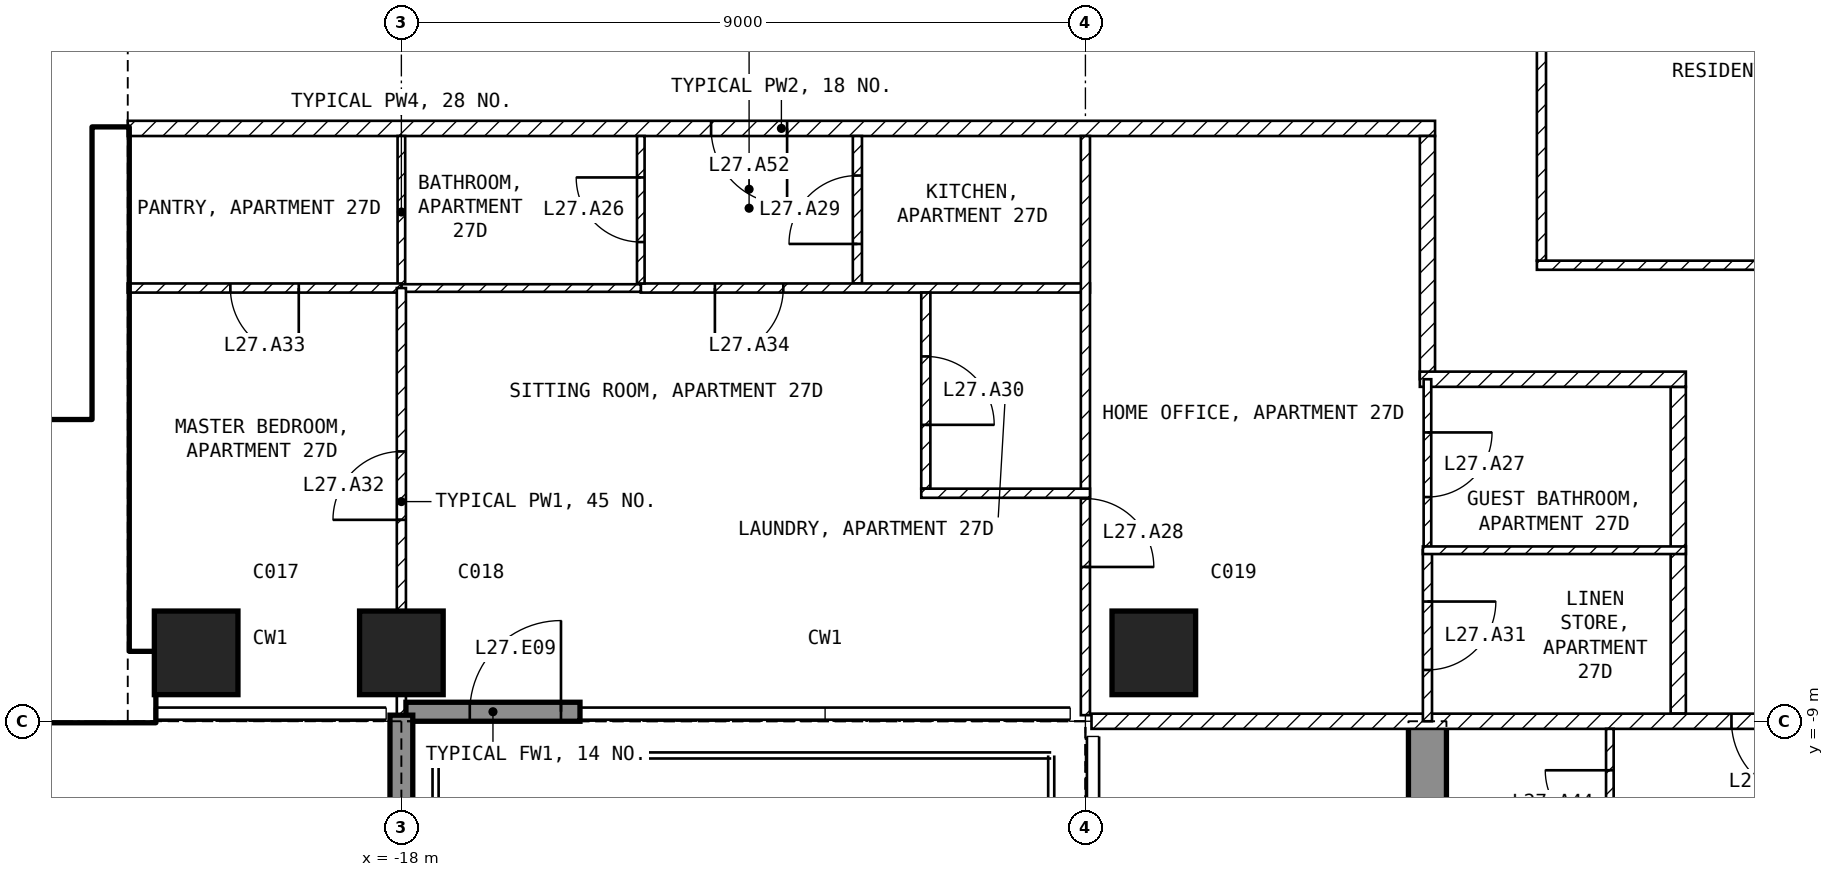
"""IFC4 building model, lengths in metres.
Left out: names, types, materials, properties, quantities, classifications, styles, units other than length and angle.
Written with IfcOpenShell. Run it as: python <this file> out.ifc"""

import sys

from ifc_helpers import new_model, si_unit, direction, frame, frame_2d, origin, origin_2d, place, context, subcontext, project, spatial, polyline, rectangle, outline, extrude, element, fill, save


model = new_model("IFC4")
c1 = context("Model", 3, precision=1e-05, world=origin(), true_north=direction((0.0, 1.0)))
c2 = subcontext(c1, "Body", "Model", "MODEL_VIEW")
j1 = project(units=[si_unit("LENGTHUNIT", "METRE"), si_unit("PLANEANGLEUNIT", "RADIAN")], contexts=[c1])
p1 = place(None, origin())
s1 = spatial("IfcSite", under=j1, at=p1, CompositionType="ELEMENT")
p2 = place(p1, origin())
s2 = spatial("IfcBuilding", under=s1, at=p2, CompositionType="ELEMENT")
p3 = place(p2, frame((0.0, 0.0, 116.4)))
s3 = spatial("IfcBuildingStorey", under=s2, at=p3, CompositionType="ELEMENT", Elevation=116.4)
for number, where, z_axis, x_axis in (
    (1, (-20.7, -8.1, -0.25), (0.0, 0.0, 1.0), (1.0, 0.0, 0.0)),
    (2, (-18.0, -8.1, -0.25), (0.0, 0.0, 1.0), (1.0, 0.0, 0.0)),
    (3, (-8.1, -8.1, -0.25), (0.0, 0.0, 1.0), (1.0, 0.0, 0.0)),
):
    element("IfcColumn", number, at=place(p3, frame(where, z_axis=z_axis, x_axis=x_axis)), inside=s3, PredefinedType="COLUMN", context=c2, shape_type="SweptSolid", body=[
        extrude(rectangle(XDim=1.1, YDim=1.1, at=origin_2d()), origin(), (0.0, 0.0, 1.0), 3.5),
    ])
p4 = place(p3, frame((-4.75, -20.15, -0.25), z_axis=(1.0, 0.0, 0.0), x_axis=(0.0, 1.0, 0.0)))
e4 = element("IfcWall", 4, at=p4, inside=s3, PredefinedType="SHEAR", context=c2, shape_type="SweptSolid", body=[
    extrude(outline(polyline([(0.0, 0.0), (6.65, 0.0), (6.65, 2.65), (9.05, 2.65), (9.05, 0.0), (11.15, 0.0), (11.15, 3.5), (0.0, 3.5), (0.0, 0.0)])), origin(), (0.0, 0.0, 1.0), 0.5),
])
p5 = place(p3, frame((-17.94, -8.875, 0.0), z_axis=(0.0, 0.0, 1.0), x_axis=(1.0, 0.0, 0.0)))
e5 = element("IfcWall", 5, at=p5, inside=s3, PredefinedType="SOLIDWALL", context=c2, shape_type="SweptSolid", body=[
    extrude(rectangle(XDim=2.29, YDim=0.25, at=frame_2d((1.145, 0.0))), origin(), (0.0, 0.0, 1.0), 3.25),
])
p6 = place(p5, frame((0.84, 0.0, 0.0)))
e6 = element("IfcOpeningElement", 6, at=p6, cuts=e5, PredefinedType="OPENING", context=c2, shape_type="SweptSolid", body=[
    extrude(rectangle(XDim=1.2, YDim=2.4, at=frame_2d((0.6, 1.2))), frame((0.0, 0.135, 0.0), z_axis=(0.0, -1.0, 0.0), x_axis=(1.0, 0.0, 0.0)), (0.0, 0.0, 1.0), 0.27),
])
p7 = place(p3, frame((-18.0, -8.92, 0.0), z_axis=(0.0, 0.0, 1.0), x_axis=(0.0, -1.0, 0.0)))
e7 = element("IfcWall", 7, at=p7, inside=s3, PredefinedType="SOLIDWALL", context=c2, shape_type="SweptSolid", body=[
    extrude(rectangle(XDim=2.82, YDim=0.3, at=frame_2d((1.41, 0.0))), origin(), (0.0, 0.0, 1.0), 3.25),
])
p8 = place(p3, frame((-30.2, -8.55, 0.0), z_axis=(0.0, 0.0, 1.0), x_axis=(1.0, 0.0, 0.0)))
e8 = element("IfcWall", 8, at=p8, inside=s3, PredefinedType="SHEAR", context=c2, shape_type="SweptSolid", body=[
    extrude(rectangle(XDim=8.95, YDim=0.9, at=frame_2d((4.475, 0.0))), origin(), (0.0, 0.0, 1.0), 3.25),
])
p9 = place(p3, frame((-21.825, -8.1, 0.0), z_axis=(0.0, 0.0, 1.0), x_axis=(0.0, 1.0, 0.0)))
e9 = element("IfcWall", 9, at=p9, inside=s3, PredefinedType="SHEAR", context=c2, shape_type="SweptSolid", body=[
    extrude(rectangle(XDim=6.9, YDim=0.45, at=frame_2d((3.45, 0.0))), origin(), (0.0, 0.0, 1.0), 3.25),
])
p10 = place(p3, frame((-28.35, -5.15, 0.0), z_axis=(0.0, 0.0, 1.0), x_axis=(1.0, 0.0, 0.0)))
e10 = element("IfcWall", 10, at=p10, inside=s3, PredefinedType="SOLIDWALL", context=c2, shape_type="SweptSolid", body=[
    extrude(rectangle(XDim=6.3, YDim=0.2, at=frame_2d((3.15, 0.0))), origin(), (0.0, 0.0, 1.0), 3.25),
])
p11 = place(p10, frame((5.1, 0.0, 0.0)))
e11 = element("IfcOpeningElement", 11, at=p11, cuts=e10, PredefinedType="OPENING", context=c2, shape_type="SweptSolid", body=[
    extrude(rectangle(XDim=1.0, YDim=2.1, at=frame_2d((0.5, 1.05))), frame((0.0, 0.11, 0.0), z_axis=(0.0, -1.0, 0.0), x_axis=(1.0, 0.0, 0.0)), (0.0, 0.0, 1.0), 0.22),
])
p12 = place(p3, frame((-3.06, -3.0, 0.0), z_axis=(0.0, 0.0, 1.0), x_axis=(1.0, 0.0, 0.0)))
e12 = element("IfcWall", 12, at=p12, inside=s3, PredefinedType="PARTITIONING", context=c2, shape_type="SweptSolid", body=[
    extrude(rectangle(XDim=6.12, YDim=0.12, at=frame_2d((3.06, 0.0))), origin(), (0.0, 0.0, 1.0), 3.25),
])
p13 = place(p3, frame((-3.0, 2.94, 0.0), z_axis=(0.0, 0.0, 1.0), x_axis=(0.0, -1.0, 0.0)))
e13 = element("IfcWall", 13, at=p13, inside=s3, PredefinedType="PARTITIONING", context=c2, shape_type="SweptSolid", body=[
    extrude(rectangle(XDim=5.88, YDim=0.12, at=frame_2d((2.94, 0.0))), origin(), (0.0, 0.0, 1.0), 3.25),
])
p14 = place(p3, frame((-4.4, -1.2, 0.0), z_axis=(0.0, 0.0, 1.0), x_axis=(-1.0, 0.0, 0.0)))
e14 = element("IfcWall", 14, at=p14, inside=s3, PredefinedType="PARTITIONING", context=c2, shape_type="SweptSolid", body=[
    extrude(rectangle(XDim=17.2, YDim=0.2, at=frame_2d((8.6, 0.0))), origin(), (0.0, 0.0, 1.0), 3.25),
])
p15 = place(p14, frame((8.525, 0.0, 0.0)))
e15 = element("IfcOpeningElement", 15, at=p15, cuts=e14, PredefinedType="OPENING", context=c2, shape_type="SweptSolid", body=[
    extrude(rectangle(XDim=1.0, YDim=2.1, at=frame_2d((0.5, 1.05))), frame((0.0, 0.11, 0.0), z_axis=(0.0, -1.0, 0.0), x_axis=(1.0, 0.0, 0.0)), (0.0, 0.0, 1.0), 0.22),
])
p16 = place(p3, frame((-4.5, -4.5, 0.0), z_axis=(0.0, 0.0, 1.0), x_axis=(0.0, 1.0, 0.0)))
e16 = element("IfcWall", 16, at=p16, inside=s3, PredefinedType="PARTITIONING", context=c2, shape_type="SweptSolid", body=[
    extrude(rectangle(XDim=3.2, YDim=0.2, at=frame_2d((1.6, 0.0))), origin(), (0.0, 0.0, 1.0), 3.25),
])
p17 = place(p3, frame((-1.2, -8.9, 0.0), z_axis=(0.0, 0.0, 1.0), x_axis=(0.0, 1.0, 0.0)))
e17 = element("IfcWall", 17, at=p17, inside=s3, PredefinedType="PARTITIONING", context=c2, shape_type="SweptSolid", body=[
    extrude(rectangle(XDim=4.3, YDim=0.2, at=frame_2d((2.15, 0.0))), origin(), (0.0, 0.0, 1.0), 3.25),
])
p18 = place(p3, frame((-1.1, -4.5, 0.0), z_axis=(0.0, 0.0, 1.0), x_axis=(-1.0, 0.0, 0.0)))
e18 = element("IfcWall", 18, at=p18, inside=s3, PredefinedType="PARTITIONING", context=c2, shape_type="SweptSolid", body=[
    extrude(rectangle(XDim=3.5, YDim=0.2, at=frame_2d((1.75, 0.0))), origin(), (0.0, 0.0, 1.0), 3.25),
])
p19 = place(p3, frame((8.92, -9.0, 0.0), z_axis=(0.0, 0.0, 1.0), x_axis=(-1.0, 0.0, 0.0)))
e19 = element("IfcWall", 19, at=p19, inside=s3, PredefinedType="PARTITIONING", context=c2, shape_type="SweptSolid", body=[
    extrude(rectangle(XDim=17.84, YDim=0.2, at=frame_2d((8.92, 0.0))), origin(), (0.0, 0.0, 1.0), 3.25),
])
p20 = place(p19, frame((8.42, 0.0, 0.0)))
e20 = element("IfcOpeningElement", 20, at=p20, cuts=e19, PredefinedType="OPENING", context=c2, shape_type="SweptSolid", body=[
    extrude(rectangle(XDim=1.0, YDim=2.1, at=frame_2d((0.5, 1.05))), frame((0.0, 0.11, 0.0), z_axis=(0.0, -1.0, 0.0), x_axis=(1.0, 0.0, 0.0)), (0.0, 0.0, 1.0), 0.22),
])
p21 = place(p3, frame((-12.0, -3.24, 0.0), z_axis=(0.0, 0.0, 1.0), x_axis=(0.0, 1.0, 0.0)))
e21 = element("IfcWall", 21, at=p21, inside=s3, PredefinedType="PARTITIONING", context=c2, shape_type="SweptSolid", body=[
    extrude(rectangle(XDim=1.94, YDim=0.12, at=frame_2d((0.97, 0.0))), origin(), (0.0, 0.0, 1.0), 3.25),
])
p22 = place(p21, frame((0.52, 0.0, 0.0)))
e22 = element("IfcOpeningElement", 22, at=p22, cuts=e21, PredefinedType="OPENING", context=c2, shape_type="SweptSolid", body=[
    extrude(rectangle(XDim=0.9, YDim=2.1, at=frame_2d((0.45, 1.05))), frame((0.0, 0.07, 0.0), z_axis=(0.0, -1.0, 0.0), x_axis=(1.0, 0.0, 0.0)), (0.0, 0.0, 1.0), 0.14),
])
p23 = place(p3, frame((-8.94, -3.3, 0.0), z_axis=(0.0, 0.0, 1.0), x_axis=(-1.0, 0.0, 0.0)))
e23 = element("IfcWall", 23, at=p23, inside=s3, PredefinedType="PARTITIONING", context=c2, shape_type="SweptSolid", body=[
    extrude(rectangle(XDim=5.91, YDim=0.12, at=frame_2d((2.955, 0.0))), origin(), (0.0, 0.0, 1.0), 3.25),
])
p24 = place(p23, frame((4.035, 0.0, 0.0)))
e24 = element("IfcOpeningElement", 24, at=p24, cuts=e23, PredefinedType="OPENING", context=c2, shape_type="SweptSolid", body=[
    extrude(rectangle(XDim=0.9, YDim=2.1, at=frame_2d((0.45, 1.05))), frame((0.0, 0.07, 0.0), z_axis=(0.0, -1.0, 0.0), x_axis=(1.0, 0.0, 0.0)), (0.0, 0.0, 1.0), 0.14),
])
p25 = place(p3, frame((-9.0, -1.3, 0.0), z_axis=(0.0, 0.0, 1.0), x_axis=(0.0, -1.0, 0.0)))
e25 = element("IfcWall", 25, at=p25, inside=s3, PredefinedType="PARTITIONING", context=c2, shape_type="SweptSolid", body=[
    extrude(rectangle(XDim=7.62, YDim=0.12, at=frame_2d((3.81, 0.0))), origin(), (0.0, 0.0, 1.0), 3.25),
])
p26 = place(p25, frame((4.77, 0.0, 0.0)))
e26 = element("IfcOpeningElement", 26, at=p26, cuts=e25, PredefinedType="OPENING", context=c2, shape_type="SweptSolid", body=[
    extrude(rectangle(XDim=0.9, YDim=2.1, at=frame_2d((0.45, 1.05))), frame((0.0, 0.07, 0.0), z_axis=(0.0, -1.0, 0.0), x_axis=(1.0, 0.0, 0.0)), (0.0, 0.0, 1.0), 0.14),
])
p27 = place(p3, frame((-14.85, -3.24, 0.0), z_axis=(0.0, 0.0, 1.0), x_axis=(0.0, 1.0, 0.0)))
e27 = element("IfcWall", 27, at=p27, inside=s3, PredefinedType="PARTITIONING", context=c2, shape_type="SweptSolid", body=[
    extrude(rectangle(XDim=1.94, YDim=0.1, at=frame_2d((0.97, 0.0))), origin(), (0.0, 0.0, 1.0), 3.25),
])
p28 = place(p27, frame((0.545, 0.0, 0.0)))
e28 = element("IfcOpeningElement", 28, at=p28, cuts=e27, PredefinedType="OPENING", context=c2, shape_type="SweptSolid", body=[
    extrude(rectangle(XDim=0.85, YDim=2.1, at=frame_2d((0.425, 1.05))), frame((0.0, 0.06, 0.0), z_axis=(0.0, -1.0, 0.0), x_axis=(1.0, 0.0, 0.0)), (0.0, 0.0, 1.0), 0.12),
])
p29 = place(p3, frame((-18.0, -3.3, 0.0), z_axis=(0.0, 0.0, 1.0), x_axis=(0.0, 1.0, 0.0)))
e29 = element("IfcWall", 29, at=p29, inside=s3, PredefinedType="PARTITIONING", context=c2, shape_type="SweptSolid", body=[
    extrude(rectangle(XDim=2.0, YDim=0.1, at=frame_2d((1.0, 0.0))), origin(), (0.0, 0.0, 1.0), 2.414),
])
p30 = place(p3, frame((-14.85, -3.3, 0.0), z_axis=(0.0, 0.0, 1.0), x_axis=(-1.0, 0.0, 0.0)))
e30 = element("IfcWall", 30, at=p30, inside=s3, PredefinedType="PARTITIONING", context=c2, shape_type="SweptSolid", body=[
    extrude(rectangle(XDim=3.15, YDim=0.1, at=frame_2d((1.575, 0.0))), origin(), (0.0, 0.0, 1.0), 3.25),
])
p31 = place(p3, frame((-18.0, -3.3, 0.0), z_axis=(0.0, 0.0, 1.0), x_axis=(-1.0, 0.0, 0.0)))
e31 = element("IfcWall", 31, at=p31, inside=s3, PredefinedType="PARTITIONING", context=c2, shape_type="SweptSolid", body=[
    extrude(rectangle(XDim=3.6, YDim=0.12, at=frame_2d((1.8, 0.0))), origin(), (0.0, 0.0, 1.0), 3.25),
])
p32 = place(p31, frame((1.35, 0.0, 0.0)))
e32 = element("IfcOpeningElement", 32, at=p32, cuts=e31, PredefinedType="OPENING", context=c2, shape_type="SweptSolid", body=[
    extrude(rectangle(XDim=0.9, YDim=2.1, at=frame_2d((0.45, 1.05))), frame((0.0, 0.07, 0.0), z_axis=(0.0, -1.0, 0.0), x_axis=(1.0, 0.0, 0.0)), (0.0, 0.0, 1.0), 0.14),
])
p33 = place(p3, frame((-11.1, -3.36, 0.0), z_axis=(0.0, 0.0, 1.0), x_axis=(0.0, -1.0, 0.0)))
e33 = element("IfcWall", 33, at=p33, inside=s3, PredefinedType="PARTITIONING", context=c2, shape_type="SweptSolid", body=[
    extrude(rectangle(XDim=2.58, YDim=0.12, at=frame_2d((1.29, 0.0))), origin(), (0.0, 0.0, 1.0), 3.25),
])
p34 = place(p33, frame((0.84, 0.0, 0.0)))
e34 = element("IfcOpeningElement", 34, at=p34, cuts=e33, PredefinedType="OPENING", context=c2, shape_type="SweptSolid", body=[
    extrude(rectangle(XDim=0.9, YDim=2.1, at=frame_2d((0.45, 1.05))), frame((0.0, 0.07, 0.0), z_axis=(0.0, -1.0, 0.0), x_axis=(1.0, 0.0, 0.0)), (0.0, 0.0, 1.0), 0.14),
])
p35 = place(p3, frame((-11.16, -6.0, 0.0), z_axis=(0.0, 0.0, 1.0), x_axis=(1.0, 0.0, 0.0)))
e35 = element("IfcWall", 35, at=p35, inside=s3, PredefinedType="PARTITIONING", context=c2, shape_type="SweptSolid", body=[
    extrude(rectangle(XDim=2.22, YDim=0.12, at=frame_2d((1.11, 0.0))), origin(), (0.0, 0.0, 1.0), 3.25),
])
p36 = place(p3, frame((-18.0, -8.92, 0.0), z_axis=(0.0, 0.0, 1.0), x_axis=(0.0, 1.0, 0.0)))
e36 = element("IfcWall", 36, at=p36, inside=s3, PredefinedType="PARTITIONING", context=c2, shape_type="SweptSolid", body=[
    extrude(rectangle(XDim=5.62, YDim=0.12, at=frame_2d((2.81, 0.0))), origin(), (0.0, 0.0, 1.0), 2.414),
])
p37 = place(p36, frame((2.57, 0.0, 0.0)))
e37 = element("IfcOpeningElement", 37, at=p37, cuts=e36, PredefinedType="OPENING", context=c2, shape_type="SweptSolid", body=[
    extrude(rectangle(XDim=0.9, YDim=2.1, at=frame_2d((0.45, 1.05))), frame((0.0, 0.07, 0.0), z_axis=(0.0, -1.0, 0.0), x_axis=(1.0, 0.0, 0.0)), (0.0, 0.0, 1.0), 0.14),
])
p38 = place(p3, frame((-4.5, -4.5, 0.0), z_axis=(0.0, 0.0, 1.0), x_axis=(0.0, -1.0, 0.0)))
e38 = element("IfcWall", 38, at=p38, inside=s3, PredefinedType="PARTITIONING", context=c2, shape_type="SweptSolid", body=[
    extrude(rectangle(XDim=2.25, YDim=0.1, at=frame_2d((1.125, 0.0))), origin(), (0.0, 0.0, 1.0), 3.25),
])
p39 = place(p38, frame((0.7, 0.0, 0.0)))
e39 = element("IfcOpeningElement", 39, at=p39, cuts=e38, PredefinedType="OPENING", context=c2, shape_type="SweptSolid", body=[
    extrude(rectangle(XDim=0.85, YDim=2.1, at=frame_2d((0.425, 1.05))), frame((0.0, 0.06, 0.0), z_axis=(0.0, -1.0, 0.0), x_axis=(1.0, 0.0, 0.0)), (0.0, 0.0, 1.0), 0.12),
])
p40 = place(p3, frame((-4.5, -6.75, 0.0), z_axis=(0.0, 0.0, 1.0), x_axis=(0.0, -1.0, 0.0)))
e40 = element("IfcWall", 40, at=p40, inside=s3, PredefinedType="PARTITIONING", context=c2, shape_type="SweptSolid", body=[
    extrude(rectangle(XDim=2.25, YDim=0.12, at=frame_2d((1.125, 0.0))), origin(), (0.0, 0.0, 1.0), 3.25),
])
p41 = place(p40, frame((0.675, 0.0, 0.0)))
e41 = element("IfcOpeningElement", 41, at=p41, cuts=e40, PredefinedType="OPENING", context=c2, shape_type="SweptSolid", body=[
    extrude(rectangle(XDim=0.9, YDim=2.1, at=frame_2d((0.45, 1.05))), frame((0.0, 0.07, 0.0), z_axis=(0.0, -1.0, 0.0), x_axis=(1.0, 0.0, 0.0)), (0.0, 0.0, 1.0), 0.14),
])
p42 = place(p3, frame((-1.1, -6.75, 0.0), z_axis=(0.0, 0.0, 1.0), x_axis=(-1.0, 0.0, 0.0)))
e42 = element("IfcWall", 42, at=p42, inside=s3, PredefinedType="PARTITIONING", context=c2, shape_type="SweptSolid", body=[
    extrude(rectangle(XDim=3.46, YDim=0.1, at=frame_2d((1.73, 0.0))), origin(), (0.0, 0.0, 1.0), 3.25),
])
p43 = place(p3, frame((-2.1, -11.04, 0.0), z_axis=(0.0, 0.0, 1.0), x_axis=(0.0, 1.0, 0.0)))
e43 = element("IfcWall", 43, at=p43, inside=s3, PredefinedType="PARTITIONING", context=c2, shape_type="SweptSolid", body=[
    extrude(rectangle(XDim=1.94, YDim=0.1, at=frame_2d((0.97, 0.0))), origin(), (0.0, 0.0, 1.0), 3.25),
])
p44 = place(p43, frame((0.545, 0.0, 0.0)))
e44 = element("IfcOpeningElement", 44, at=p44, cuts=e43, PredefinedType="OPENING", context=c2, shape_type="SweptSolid", body=[
    extrude(rectangle(XDim=0.85, YDim=2.1, at=frame_2d((0.425, 1.05))), frame((0.0, 0.06, 0.0), z_axis=(0.0, -1.0, 0.0), x_axis=(1.0, 0.0, 0.0)), (0.0, 0.0, 1.0), 0.12),
])
p45 = place(p6, origin())
e45 = element("IfcDoor", 45, at=p45, inside=s3, OperationType="SINGLE_SWING_RIGHT", PredefinedType="DOOR", context=c2, shape_type="SweptSolid", body=[
    extrude(rectangle(XDim=1.2, YDim=2.4, at=frame_2d((0.6, 1.2))), frame((0.0, 0.025, 0.0), z_axis=(0.0, -1.0, 0.0), x_axis=(1.0, 0.0, 0.0)), (0.0, 0.0, 1.0), 0.05),
])
fill(e6, e45)
p46 = place(p11, origin())
e46 = element("IfcDoor", 46, at=p46, inside=s3, OperationType="SINGLE_SWING_LEFT", PredefinedType="DOOR", context=c2, shape_type="SweptSolid", body=[
    extrude(rectangle(XDim=1.0, YDim=2.1, at=frame_2d((0.5, 1.05))), frame((0.0, 0.025, 0.0), z_axis=(0.0, -1.0, 0.0), x_axis=(1.0, 0.0, 0.0)), (0.0, 0.0, 1.0), 0.05),
])
fill(e11, e46)
p47 = place(p28, origin())
e47 = element("IfcDoor", 47, at=p47, inside=s3, OperationType="SINGLE_SWING_RIGHT", PredefinedType="DOOR", context=c2, shape_type="SweptSolid", body=[
    extrude(rectangle(XDim=0.85, YDim=2.1, at=frame_2d((0.425, 1.05))), frame((0.0, 0.025, 0.0), z_axis=(0.0, -1.0, 0.0), x_axis=(1.0, 0.0, 0.0)), (0.0, 0.0, 1.0), 0.05),
])
fill(e28, e47)
p48 = place(p39, origin())
e48 = element("IfcDoor", 48, at=p48, inside=s3, OperationType="SINGLE_SWING_LEFT", PredefinedType="DOOR", context=c2, shape_type="SweptSolid", body=[
    extrude(rectangle(XDim=0.85, YDim=2.1, at=frame_2d((0.425, 1.05))), frame((0.0, 0.025, 0.0), z_axis=(0.0, -1.0, 0.0), x_axis=(1.0, 0.0, 0.0)), (0.0, 0.0, 1.0), 0.05),
])
fill(e39, e48)
p49 = place(p26, origin())
e49 = element("IfcDoor", 49, at=p49, inside=s3, OperationType="SINGLE_SWING_RIGHT", PredefinedType="DOOR", context=c2, shape_type="SweptSolid", body=[
    extrude(rectangle(XDim=0.9, YDim=2.1, at=frame_2d((0.45, 1.05))), frame((0.0, 0.025, 0.0), z_axis=(0.0, -1.0, 0.0), x_axis=(1.0, 0.0, 0.0)), (0.0, 0.0, 1.0), 0.05),
])
fill(e26, e49)
p50 = place(p22, origin())
e50 = element("IfcDoor", 50, at=p50, inside=s3, OperationType="SINGLE_SWING_LEFT", PredefinedType="DOOR", context=c2, shape_type="SweptSolid", body=[
    extrude(rectangle(XDim=0.9, YDim=2.1, at=frame_2d((0.45, 1.05))), frame((0.0, 0.025, 0.0), z_axis=(0.0, -1.0, 0.0), x_axis=(1.0, 0.0, 0.0)), (0.0, 0.0, 1.0), 0.05),
])
fill(e22, e50)
p51 = place(p34, origin())
e51 = element("IfcDoor", 51, at=p51, inside=s3, OperationType="SINGLE_SWING_RIGHT", PredefinedType="DOOR", context=c2, shape_type="SweptSolid", body=[
    extrude(rectangle(XDim=0.9, YDim=2.1, at=frame_2d((0.45, 1.05))), frame((0.0, 0.025, 0.0), z_axis=(0.0, -1.0, 0.0), x_axis=(1.0, 0.0, 0.0)), (0.0, 0.0, 1.0), 0.05),
])
fill(e34, e51)
p52 = place(p41, origin())
e52 = element("IfcDoor", 52, at=p52, inside=s3, OperationType="SINGLE_SWING_LEFT", PredefinedType="DOOR", context=c2, shape_type="SweptSolid", body=[
    extrude(rectangle(XDim=0.9, YDim=2.1, at=frame_2d((0.45, 1.05))), frame((0.0, 0.025, 0.0), z_axis=(0.0, -1.0, 0.0), x_axis=(1.0, 0.0, 0.0)), (0.0, 0.0, 1.0), 0.05),
])
fill(e41, e52)
p53 = place(p37, origin())
e53 = element("IfcDoor", 53, at=p53, inside=s3, OperationType="SINGLE_SWING_LEFT", PredefinedType="DOOR", context=c2, shape_type="SweptSolid", body=[
    extrude(rectangle(XDim=0.9, YDim=2.1, at=frame_2d((0.45, 1.05))), frame((0.0, 0.025, 0.0), z_axis=(0.0, -1.0, 0.0), x_axis=(1.0, 0.0, 0.0)), (0.0, 0.0, 1.0), 0.05),
])
fill(e37, e53)
p54 = place(p32, origin())
e54 = element("IfcDoor", 54, at=p54, inside=s3, OperationType="SINGLE_SWING_LEFT", PredefinedType="DOOR", context=c2, shape_type="SweptSolid", body=[
    extrude(rectangle(XDim=0.9, YDim=2.1, at=frame_2d((0.45, 1.05))), frame((0.0, 0.025, 0.0), z_axis=(0.0, -1.0, 0.0), x_axis=(1.0, 0.0, 0.0)), (0.0, 0.0, 1.0), 0.05),
])
fill(e32, e54)
p55 = place(p24, origin())
e55 = element("IfcDoor", 55, at=p55, inside=s3, OperationType="SINGLE_SWING_RIGHT", PredefinedType="DOOR", context=c2, shape_type="SweptSolid", body=[
    extrude(rectangle(XDim=0.9, YDim=2.1, at=frame_2d((0.45, 1.05))), frame((0.0, 0.025, 0.0), z_axis=(0.0, -1.0, 0.0), x_axis=(1.0, 0.0, 0.0)), (0.0, 0.0, 1.0), 0.05),
])
fill(e24, e55)
p56 = place(p20, origin())
e56 = element("IfcDoor", 56, at=p56, inside=s3, OperationType="SINGLE_SWING_LEFT", PredefinedType="DOOR", context=c2, shape_type="SweptSolid", body=[
    extrude(rectangle(XDim=1.0, YDim=2.1, at=frame_2d((0.5, 1.05))), frame((0.0, 0.025, 0.0), z_axis=(0.0, -1.0, 0.0), x_axis=(1.0, 0.0, 0.0)), (0.0, 0.0, 1.0), 0.05),
])
fill(e20, e56)
p57 = place(p44, origin())
e57 = element("IfcDoor", 57, at=p57, inside=s3, OperationType="SINGLE_SWING_RIGHT", PredefinedType="DOOR", context=c2, shape_type="SweptSolid", body=[
    extrude(rectangle(XDim=0.85, YDim=2.1, at=frame_2d((0.425, 1.05))), frame((0.0, 0.025, 0.0), z_axis=(0.0, -1.0, 0.0), x_axis=(1.0, 0.0, 0.0)), (0.0, 0.0, 1.0), 0.05),
])
fill(e44, e57)
p58 = place(p15, origin())
e58 = element("IfcDoor", 58, at=p58, inside=s3, OperationType="SINGLE_SWING_LEFT", PredefinedType="DOOR", context=c2, shape_type="SweptSolid", body=[
    extrude(rectangle(XDim=1.0, YDim=2.1, at=frame_2d((0.5, 1.05))), frame((0.0, 0.025, 0.0), z_axis=(0.0, -1.0, 0.0), x_axis=(1.0, 0.0, 0.0)), (0.0, 0.0, 1.0), 0.05),
])
fill(e15, e58)
save(model, sys.argv[1])
